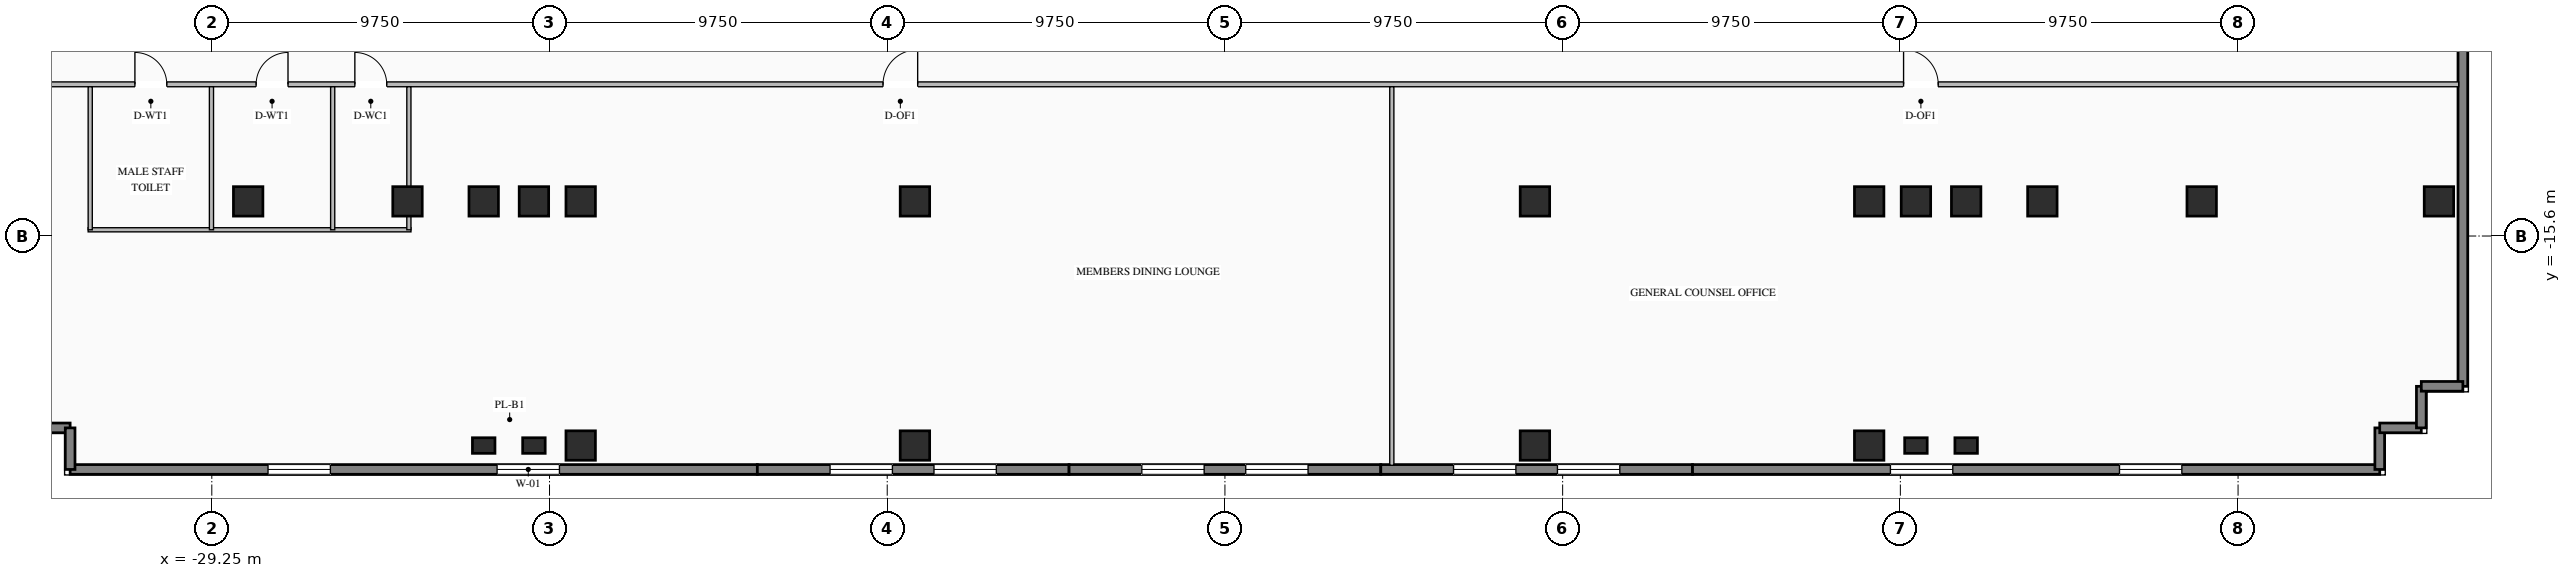
"""IFC4 building model, lengths in metres.
Left out: names, types, materials, properties, quantities, classifications, styles, units other than length and angle.
Written with IfcOpenShell. Run it as: python <this file> out.ifc"""

import sys

from ifc_helpers import new_model, si_unit, direction, frame, frame_2d, origin, origin_2d, place, context, subcontext, project, spatial, rectangle, i_section, extrude, element, fill, save


model = new_model("IFC4")
c1 = context("Model", 3, precision=1e-05, world=origin(), true_north=direction((0.0, 1.0)))
c2 = subcontext(c1, "Body", "Model", "MODEL_VIEW")
j1 = project(units=[si_unit("LENGTHUNIT", "METRE"), si_unit("PLANEANGLEUNIT", "RADIAN")], contexts=[c1])
p1 = place(None, origin())
s1 = spatial("IfcSite", under=j1, at=p1, CompositionType="ELEMENT")
p2 = place(p1, origin())
s2 = spatial("IfcBuilding", under=s1, at=p2, CompositionType="ELEMENT")
p3 = place(p2, frame((0.0, 0.0, 65.7)))
s3 = spatial("IfcBuildingStorey", under=s2, at=p3, CompositionType="ELEMENT", Elevation=65.7)
for number, where, z_axis, x_axis in (
    (1, (-21.4, -14.6, 0.0), (0.0, 0.0, 1.0), (1.0, 0.0, 0.0)),
    (2, (-19.95, -14.6, 0.0), (0.0, 0.0, 1.0), (1.0, 0.0, 0.0)),
    (3, (-18.6, -14.6, 0.0), (0.0, 0.0, 1.0), (1.0, 0.0, 0.0)),
    (4, (-8.95, -14.6, 0.0), (0.0, 0.0, 1.0), (1.0, 0.0, 0.0)),
    (5, (8.95, -14.6, 0.0), (0.0, 0.0, 1.0), (1.0, 0.0, 0.0)),
    (6, (18.6, -14.6, 0.0), (0.0, 0.0, 1.0), (1.0, 0.0, 0.0)),
    (7, (19.95, -14.6, 0.0), (0.0, 0.0, 1.0), (1.0, 0.0, 0.0)),
    (8, (21.4, -14.6, 0.0), (0.0, 0.0, 1.0), (1.0, 0.0, 0.0)),
    (9, (-23.6, -14.6, 0.0), (0.0, 0.0, 1.0), (1.0, 0.0, 0.0)),
    (10, (23.6, -14.6, 0.0), (0.0, 0.0, 1.0), (1.0, 0.0, 0.0)),
    (11, (-28.2, -14.6, 0.0), (0.0, 0.0, 1.0), (1.0, 0.0, 0.0)),
    (12, (28.2, -14.6, 0.0), (0.0, 0.0, 1.0), (1.0, 0.0, 0.0)),
    (13, (-18.6, -21.65, 0.0), (0.0, 0.0, 1.0), (1.0, 0.0, 0.0)),
    (14, (-8.95, -21.65, 0.0), (0.0, 0.0, 1.0), (1.0, 0.0, 0.0)),
    (15, (8.95, -21.65, 0.0), (0.0, 0.0, 1.0), (1.0, 0.0, 0.0)),
    (16, (18.6, -21.65, 0.0), (0.0, 0.0, 1.0), (1.0, 0.0, 0.0)),
    (17, (35.05, -14.6, 0.0), (0.0, 0.0, 1.0), (1.0, 0.0, 0.0)),
):
    element("IfcColumn", number, at=place(p3, frame(where, z_axis=z_axis, x_axis=x_axis)), inside=s3, PredefinedType="COLUMN", context=c2, shape_type="SweptSolid", body=[
        extrude(i_section(OverallWidth=0.85, OverallDepth=0.85, WebThickness=0.032, FlangeThickness=0.048, at=origin_2d()), origin(), (0.0, 0.0, 1.0), 4.3),
    ])
for number, where, z_axis, x_axis in (
    (18, (-21.4, -21.65, 0.0), (0.0, 0.0, 1.0), (1.0, 0.0, 0.0)),
    (19, (-19.95, -21.65, 0.0), (0.0, 0.0, 1.0), (1.0, 0.0, 0.0)),
    (20, (19.95, -21.65, 0.0), (0.0, 0.0, 1.0), (1.0, 0.0, 0.0)),
    (21, (21.4, -21.65, 0.0), (0.0, 0.0, 1.0), (1.0, 0.0, 0.0)),
):
    element("IfcColumn", number, at=place(p3, frame(where, z_axis=z_axis, x_axis=x_axis)), inside=s3, PredefinedType="PILASTER", context=c2, shape_type="SweptSolid", body=[
        extrude(rectangle(XDim=0.65, YDim=0.45, at=origin_2d()), origin(), (0.0, 0.0, 1.0), 4.3),
    ])
p4 = place(p3, frame((-13.5, -22.34, 0.0), z_axis=(0.0, 0.0, 1.0), x_axis=(-1.0, 0.0, 0.0)))
e22 = element("IfcWall", 22, at=p4, inside=s3, PredefinedType="STANDARD", context=c2, shape_type="SweptSolid", body=[
    extrude(rectangle(XDim=19.84, YDim=0.28, at=frame_2d((9.92, 0.0))), origin(), (0.0, 0.0, 1.0), 4.0),
])
p5 = place(p4, frame((5.713, 0.0, 0.76)))
e23 = element("IfcOpeningElement", 23, at=p5, cuts=e22, PredefinedType="OPENING", context=c2, shape_type="SweptSolid", body=[
    extrude(rectangle(XDim=1.8, YDim=1.95, at=frame_2d((0.9, 0.975))), frame((0.0, 0.15, 0.0), z_axis=(0.0, -1.0, 0.0), x_axis=(1.0, 0.0, 0.0)), (0.0, 0.0, 1.0), 0.3),
])
p6 = place(p4, frame((12.327, 0.0, 0.76)))
e24 = element("IfcOpeningElement", 24, at=p6, cuts=e22, PredefinedType="OPENING", context=c2, shape_type="SweptSolid", body=[
    extrude(rectangle(XDim=1.8, YDim=1.95, at=frame_2d((0.9, 0.975))), frame((0.0, 0.15, 0.0), z_axis=(0.0, -1.0, 0.0), x_axis=(1.0, 0.0, 0.0)), (0.0, 0.0, 1.0), 0.3),
])
p7 = place(p3, frame((-4.5, -22.34, 0.0), z_axis=(0.0, 0.0, 1.0), x_axis=(-1.0, 0.0, 0.0)))
e25 = element("IfcWall", 25, at=p7, inside=s3, PredefinedType="STANDARD", context=c2, shape_type="SweptSolid", body=[
    extrude(rectangle(XDim=9.0, YDim=0.28, at=frame_2d((4.5, 0.0))), origin(), (0.0, 0.0, 1.0), 4.0),
])
p8 = place(p7, frame((2.1, 0.0, 0.76)))
e26 = element("IfcOpeningElement", 26, at=p8, cuts=e25, PredefinedType="OPENING", context=c2, shape_type="SweptSolid", body=[
    extrude(rectangle(XDim=1.8, YDim=1.95, at=frame_2d((0.9, 0.975))), frame((0.0, 0.15, 0.0), z_axis=(0.0, -1.0, 0.0), x_axis=(1.0, 0.0, 0.0)), (0.0, 0.0, 1.0), 0.3),
])
p9 = place(p7, frame((5.1, 0.0, 0.76)))
e27 = element("IfcOpeningElement", 27, at=p9, cuts=e25, PredefinedType="OPENING", context=c2, shape_type="SweptSolid", body=[
    extrude(rectangle(XDim=1.8, YDim=1.95, at=frame_2d((0.9, 0.975))), frame((0.0, 0.15, 0.0), z_axis=(0.0, -1.0, 0.0), x_axis=(1.0, 0.0, 0.0)), (0.0, 0.0, 1.0), 0.3),
])
p10 = place(p3, frame((4.5, -22.34, 0.0), z_axis=(0.0, 0.0, 1.0), x_axis=(-1.0, 0.0, 0.0)))
e28 = element("IfcWall", 28, at=p10, inside=s3, PredefinedType="STANDARD", context=c2, shape_type="SweptSolid", body=[
    extrude(rectangle(XDim=9.0, YDim=0.28, at=frame_2d((4.5, 0.0))), origin(), (0.0, 0.0, 1.0), 4.0),
])
p11 = place(p10, frame((2.1, 0.0, 0.76)))
e29 = element("IfcOpeningElement", 29, at=p11, cuts=e28, PredefinedType="OPENING", context=c2, shape_type="SweptSolid", body=[
    extrude(rectangle(XDim=1.8, YDim=1.95, at=frame_2d((0.9, 0.975))), frame((0.0, 0.15, 0.0), z_axis=(0.0, -1.0, 0.0), x_axis=(1.0, 0.0, 0.0)), (0.0, 0.0, 1.0), 0.3),
])
p12 = place(p10, frame((5.1, 0.0, 0.76)))
e30 = element("IfcOpeningElement", 30, at=p12, cuts=e28, PredefinedType="OPENING", context=c2, shape_type="SweptSolid", body=[
    extrude(rectangle(XDim=1.8, YDim=1.95, at=frame_2d((0.9, 0.975))), frame((0.0, 0.15, 0.0), z_axis=(0.0, -1.0, 0.0), x_axis=(1.0, 0.0, 0.0)), (0.0, 0.0, 1.0), 0.3),
])
p13 = place(p3, frame((13.5, -22.34, 0.0), z_axis=(0.0, 0.0, 1.0), x_axis=(-1.0, 0.0, 0.0)))
e31 = element("IfcWall", 31, at=p13, inside=s3, PredefinedType="STANDARD", context=c2, shape_type="SweptSolid", body=[
    extrude(rectangle(XDim=9.0, YDim=0.28, at=frame_2d((4.5, 0.0))), origin(), (0.0, 0.0, 1.0), 4.0),
])
p14 = place(p13, frame((2.1, 0.0, 0.76)))
e32 = element("IfcOpeningElement", 32, at=p14, cuts=e31, PredefinedType="OPENING", context=c2, shape_type="SweptSolid", body=[
    extrude(rectangle(XDim=1.8, YDim=1.95, at=frame_2d((0.9, 0.975))), frame((0.0, 0.15, 0.0), z_axis=(0.0, -1.0, 0.0), x_axis=(1.0, 0.0, 0.0)), (0.0, 0.0, 1.0), 0.3),
])
p15 = place(p13, frame((5.1, 0.0, 0.76)))
e33 = element("IfcOpeningElement", 33, at=p15, cuts=e31, PredefinedType="OPENING", context=c2, shape_type="SweptSolid", body=[
    extrude(rectangle(XDim=1.8, YDim=1.95, at=frame_2d((0.9, 0.975))), frame((0.0, 0.15, 0.0), z_axis=(0.0, -1.0, 0.0), x_axis=(1.0, 0.0, 0.0)), (0.0, 0.0, 1.0), 0.3),
])
p16 = place(p3, frame((33.34, -22.34, 0.0), z_axis=(0.0, 0.0, 1.0), x_axis=(-1.0, 0.0, 0.0)))
e34 = element("IfcWall", 34, at=p16, inside=s3, PredefinedType="STANDARD", context=c2, shape_type="SweptSolid", body=[
    extrude(rectangle(XDim=19.84, YDim=0.28, at=frame_2d((9.92, 0.0))), origin(), (0.0, 0.0, 1.0), 4.0),
])
p17 = place(p16, frame((5.713, 0.0, 0.76)))
e35 = element("IfcOpeningElement", 35, at=p17, cuts=e34, PredefinedType="OPENING", context=c2, shape_type="SweptSolid", body=[
    extrude(rectangle(XDim=1.8, YDim=1.95, at=frame_2d((0.9, 0.975))), frame((0.0, 0.15, 0.0), z_axis=(0.0, -1.0, 0.0), x_axis=(1.0, 0.0, 0.0)), (0.0, 0.0, 1.0), 0.3),
])
p18 = place(p16, frame((12.327, 0.0, 0.76)))
e36 = element("IfcOpeningElement", 36, at=p18, cuts=e34, PredefinedType="OPENING", context=c2, shape_type="SweptSolid", body=[
    extrude(rectangle(XDim=1.8, YDim=1.95, at=frame_2d((0.9, 0.975))), frame((0.0, 0.15, 0.0), z_axis=(0.0, -1.0, 0.0), x_axis=(1.0, 0.0, 0.0)), (0.0, 0.0, 1.0), 0.3),
])
p19 = place(p3, frame((35.74, 0.0, 0.0), z_axis=(0.0, 0.0, 1.0), x_axis=(0.0, -1.0, 0.0)))
e37 = element("IfcWall", 37, at=p19, inside=s3, PredefinedType="STANDARD", context=c2, shape_type="SweptSolid", body=[
    extrude(rectangle(XDim=19.94, YDim=0.28, at=frame_2d((9.97, 0.0))), origin(), (0.0, 0.0, 1.0), 4.0),
])
p20 = place(p19, frame((5.847, 0.0, 0.76)))
e38 = element("IfcOpeningElement", 38, at=p20, cuts=e37, PredefinedType="OPENING", context=c2, shape_type="SweptSolid", body=[
    extrude(rectangle(XDim=1.6, YDim=1.95, at=frame_2d((0.8, 0.975))), frame((0.0, 0.15, 0.0), z_axis=(0.0, -1.0, 0.0), x_axis=(1.0, 0.0, 0.0)), (0.0, 0.0, 1.0), 0.3),
])
p21 = place(p3, frame((33.34, -22.34, 0.0), z_axis=(0.0, 0.0, 1.0), x_axis=(0.0, 1.0, 0.0)))
e39 = element("IfcWall", 39, at=p21, inside=s3, PredefinedType="STANDARD", context=c2, shape_type="SweptSolid", body=[
    extrude(rectangle(XDim=1.2, YDim=0.28, at=frame_2d((0.6, 0.0))), origin(), (0.0, 0.0, 1.0), 4.0),
])
for number, where, z_axis, x_axis in (
    (40, (33.34, -21.14, 0.0), (0.0, 0.0, 1.0), (1.0, 0.0, 0.0)),
    (41, (34.54, -21.14, 0.0), (0.0, 0.0, 1.0), (0.0, 1.0, 0.0)),
    (42, (34.54, -19.94, 0.0), (0.0, 0.0, 1.0), (1.0, 0.0, 0.0)),
    (43, (-34.54, -21.14, 0.0), (0.0, 0.0, 1.0), (1.0, 0.0, 0.0)),
):
    element("IfcWall", number, at=place(p3, frame(where, z_axis=z_axis, x_axis=x_axis)), inside=s3, PredefinedType="STANDARD", context=c2, shape_type="SweptSolid", body=[
        extrude(rectangle(XDim=1.2, YDim=0.28, at=frame_2d((0.6, 0.0))), origin(), (0.0, 0.0, 1.0), 4.0),
    ])
p22 = place(p3, frame((-33.34, -21.14, 0.0), z_axis=(0.0, 0.0, 1.0), x_axis=(0.0, -1.0, 0.0)))
e44 = element("IfcWall", 44, at=p22, inside=s3, PredefinedType="STANDARD", context=c2, shape_type="SweptSolid", body=[
    extrude(rectangle(XDim=1.2, YDim=0.28, at=frame_2d((0.6, 0.0))), origin(), (0.0, 0.0, 1.0), 4.0),
])
p23 = place(p3, frame((-35.62, -11.22, 0.0), z_axis=(0.0, 0.0, 1.0), x_axis=(1.0, 0.0, 0.0)))
e45 = element("IfcWall", 45, at=p23, inside=s3, PredefinedType="STANDARD", context=c2, shape_type="SweptSolid", body=[
    extrude(rectangle(XDim=71.24, YDim=0.14, at=frame_2d((35.62, 0.0))), origin(), (0.0, 0.0, 1.0), 3.495),
])
p24 = place(p23, frame((4.15, 0.0, 0.0)))
e46 = element("IfcOpeningElement", 46, at=p24, cuts=e45, PredefinedType="OPENING", context=c2, shape_type="SweptSolid", body=[
    extrude(rectangle(XDim=0.92, YDim=2.08, at=frame_2d((0.46, 1.04))), frame((0.0, 0.08, 0.0), z_axis=(0.0, -1.0, 0.0), x_axis=(1.0, 0.0, 0.0)), (0.0, 0.0, 1.0), 0.16),
])
p25 = place(p23, frame((7.65, 0.0, 0.0)))
e47 = element("IfcOpeningElement", 47, at=p25, cuts=e45, PredefinedType="OPENING", context=c2, shape_type="SweptSolid", body=[
    extrude(rectangle(XDim=0.92, YDim=2.08, at=frame_2d((0.46, 1.04))), frame((0.0, 0.08, 0.0), z_axis=(0.0, -1.0, 0.0), x_axis=(1.0, 0.0, 0.0)), (0.0, 0.0, 1.0), 0.16),
])
p26 = place(p23, frame((10.5, 0.0, 0.0)))
e48 = element("IfcOpeningElement", 48, at=p26, cuts=e45, PredefinedType="OPENING", context=c2, shape_type="SweptSolid", body=[
    extrude(rectangle(XDim=0.92, YDim=2.08, at=frame_2d((0.46, 1.04))), frame((0.0, 0.08, 0.0), z_axis=(0.0, -1.0, 0.0), x_axis=(1.0, 0.0, 0.0)), (0.0, 0.0, 1.0), 0.16),
])
p27 = place(p23, frame((25.749, 0.0, 0.0)))
e49 = element("IfcOpeningElement", 49, at=p27, cuts=e45, PredefinedType="OPENING", context=c2, shape_type="SweptSolid", body=[
    extrude(rectangle(XDim=1.0, YDim=2.08, at=frame_2d((0.5, 1.04))), frame((0.0, 0.08, 0.0), z_axis=(0.0, -1.0, 0.0), x_axis=(1.0, 0.0, 0.0)), (0.0, 0.0, 1.0), 0.16),
])
p28 = place(p23, frame((55.213, 0.0, 0.0)))
e50 = element("IfcOpeningElement", 50, at=p28, cuts=e45, PredefinedType="OPENING", context=c2, shape_type="SweptSolid", body=[
    extrude(rectangle(XDim=1.0, YDim=2.08, at=frame_2d((0.5, 1.04))), frame((0.0, 0.08, 0.0), z_axis=(0.0, -1.0, 0.0), x_axis=(1.0, 0.0, 0.0)), (0.0, 0.0, 1.0), 0.16),
])
p29 = place(p3, frame((-32.82, -15.42, 0.0), z_axis=(0.0, 0.0, 1.0), x_axis=(1.0, 0.0, 0.0)))
e51 = element("IfcWall", 51, at=p29, inside=s3, PredefinedType="STANDARD", context=c2, shape_type="SweptSolid", body=[
    extrude(rectangle(XDim=9.32, YDim=0.12, at=frame_2d((4.66, 0.0))), origin(), (0.0, 0.0, 1.0), 4.0),
])
for number, where, z_axis, x_axis in (
    (52, (-32.76, -15.42, 0.0), (0.0, 0.0, 1.0), (0.0, 1.0, 0.0)),
    (53, (-29.26, -15.42, 0.0), (0.0, 0.0, 1.0), (0.0, 1.0, 0.0)),
    (54, (-25.76, -15.42, 0.0), (0.0, 0.0, 1.0), (0.0, 1.0, 0.0)),
):
    element("IfcWall", number, at=place(p3, frame(where, z_axis=z_axis, x_axis=x_axis)), inside=s3, PredefinedType="STANDARD", context=c2, shape_type="SweptSolid", body=[
        extrude(rectangle(XDim=4.13, YDim=0.12, at=frame_2d((2.065, 0.0))), origin(), (0.0, 0.0, 1.0), 4.0),
    ])
p30 = place(p3, frame((-23.56, -15.42, 0.0), z_axis=(0.0, 0.0, 1.0), x_axis=(0.0, 1.0, 0.0)))
e55 = element("IfcWall", 55, at=p30, inside=s3, PredefinedType="STANDARD", context=c2, shape_type="SweptSolid", body=[
    extrude(rectangle(XDim=4.13, YDim=0.12, at=frame_2d((2.065, 0.0))), origin(), (0.0, 0.0, 1.0), 3.395),
])
p31 = place(p3, frame((4.818, -22.22, 0.0), z_axis=(0.0, 0.0, 1.0), x_axis=(0.0, 1.0, 0.0)))
e56 = element("IfcWall", 56, at=p31, inside=s3, PredefinedType="STANDARD", context=c2, shape_type="SweptSolid", body=[
    extrude(rectangle(XDim=10.93, YDim=0.12, at=frame_2d((5.465, 0.0))), origin(), (0.0, 0.0, 1.0), 4.0),
])
p32 = place(p5, origin())
e57 = element("IfcWindow", 57, at=p32, inside=s3, PartitioningType="SINGLE_PANEL", PredefinedType="WINDOW", context=c2, shape_type="SweptSolid", body=[
    extrude(rectangle(XDim=1.8, YDim=1.95, at=frame_2d((0.9, 0.975))), frame((0.0, 0.03, 0.0), z_axis=(0.0, -1.0, 0.0), x_axis=(1.0, 0.0, 0.0)), (0.0, 0.0, 1.0), 0.06),
])
fill(e23, e57)
p33 = place(p6, origin())
e58 = element("IfcWindow", 58, at=p33, inside=s3, PartitioningType="SINGLE_PANEL", PredefinedType="WINDOW", context=c2, shape_type="SweptSolid", body=[
    extrude(rectangle(XDim=1.8, YDim=1.95, at=frame_2d((0.9, 0.975))), frame((0.0, 0.03, 0.0), z_axis=(0.0, -1.0, 0.0), x_axis=(1.0, 0.0, 0.0)), (0.0, 0.0, 1.0), 0.06),
])
fill(e24, e58)
p34 = place(p8, origin())
e59 = element("IfcWindow", 59, at=p34, inside=s3, PartitioningType="SINGLE_PANEL", PredefinedType="WINDOW", context=c2, shape_type="SweptSolid", body=[
    extrude(rectangle(XDim=1.8, YDim=1.95, at=frame_2d((0.9, 0.975))), frame((0.0, 0.03, 0.0), z_axis=(0.0, -1.0, 0.0), x_axis=(1.0, 0.0, 0.0)), (0.0, 0.0, 1.0), 0.06),
])
fill(e26, e59)
p35 = place(p9, origin())
e60 = element("IfcWindow", 60, at=p35, inside=s3, PartitioningType="SINGLE_PANEL", PredefinedType="WINDOW", context=c2, shape_type="SweptSolid", body=[
    extrude(rectangle(XDim=1.8, YDim=1.95, at=frame_2d((0.9, 0.975))), frame((0.0, 0.03, 0.0), z_axis=(0.0, -1.0, 0.0), x_axis=(1.0, 0.0, 0.0)), (0.0, 0.0, 1.0), 0.06),
])
fill(e27, e60)
p36 = place(p11, origin())
e61 = element("IfcWindow", 61, at=p36, inside=s3, PartitioningType="SINGLE_PANEL", PredefinedType="WINDOW", context=c2, shape_type="SweptSolid", body=[
    extrude(rectangle(XDim=1.8, YDim=1.95, at=frame_2d((0.9, 0.975))), frame((0.0, 0.03, 0.0), z_axis=(0.0, -1.0, 0.0), x_axis=(1.0, 0.0, 0.0)), (0.0, 0.0, 1.0), 0.06),
])
fill(e29, e61)
p37 = place(p12, origin())
e62 = element("IfcWindow", 62, at=p37, inside=s3, PartitioningType="SINGLE_PANEL", PredefinedType="WINDOW", context=c2, shape_type="SweptSolid", body=[
    extrude(rectangle(XDim=1.8, YDim=1.95, at=frame_2d((0.9, 0.975))), frame((0.0, 0.03, 0.0), z_axis=(0.0, -1.0, 0.0), x_axis=(1.0, 0.0, 0.0)), (0.0, 0.0, 1.0), 0.06),
])
fill(e30, e62)
p38 = place(p14, origin())
e63 = element("IfcWindow", 63, at=p38, inside=s3, PartitioningType="SINGLE_PANEL", PredefinedType="WINDOW", context=c2, shape_type="SweptSolid", body=[
    extrude(rectangle(XDim=1.8, YDim=1.95, at=frame_2d((0.9, 0.975))), frame((0.0, 0.03, 0.0), z_axis=(0.0, -1.0, 0.0), x_axis=(1.0, 0.0, 0.0)), (0.0, 0.0, 1.0), 0.06),
])
fill(e32, e63)
p39 = place(p15, origin())
e64 = element("IfcWindow", 64, at=p39, inside=s3, PartitioningType="SINGLE_PANEL", PredefinedType="WINDOW", context=c2, shape_type="SweptSolid", body=[
    extrude(rectangle(XDim=1.8, YDim=1.95, at=frame_2d((0.9, 0.975))), frame((0.0, 0.03, 0.0), z_axis=(0.0, -1.0, 0.0), x_axis=(1.0, 0.0, 0.0)), (0.0, 0.0, 1.0), 0.06),
])
fill(e33, e64)
p40 = place(p17, origin())
e65 = element("IfcWindow", 65, at=p40, inside=s3, PartitioningType="SINGLE_PANEL", PredefinedType="WINDOW", context=c2, shape_type="SweptSolid", body=[
    extrude(rectangle(XDim=1.8, YDim=1.95, at=frame_2d((0.9, 0.975))), frame((0.0, 0.03, 0.0), z_axis=(0.0, -1.0, 0.0), x_axis=(1.0, 0.0, 0.0)), (0.0, 0.0, 1.0), 0.06),
])
fill(e35, e65)
p41 = place(p18, origin())
e66 = element("IfcWindow", 66, at=p41, inside=s3, PartitioningType="SINGLE_PANEL", PredefinedType="WINDOW", context=c2, shape_type="SweptSolid", body=[
    extrude(rectangle(XDim=1.8, YDim=1.95, at=frame_2d((0.9, 0.975))), frame((0.0, 0.03, 0.0), z_axis=(0.0, -1.0, 0.0), x_axis=(1.0, 0.0, 0.0)), (0.0, 0.0, 1.0), 0.06),
])
fill(e36, e66)
p42 = place(p24, origin())
e67 = element("IfcDoor", 67, at=p42, inside=s3, OperationType="SINGLE_SWING_LEFT", PredefinedType="DOOR", context=c2, shape_type="SweptSolid", body=[
    extrude(rectangle(XDim=0.92, YDim=2.08, at=frame_2d((0.46, 1.04))), frame((0.0, 0.025, 0.0), z_axis=(0.0, -1.0, 0.0), x_axis=(1.0, 0.0, 0.0)), (0.0, 0.0, 1.0), 0.05),
])
fill(e46, e67)
p43 = place(p25, origin())
e68 = element("IfcDoor", 68, at=p43, inside=s3, OperationType="SINGLE_SWING_RIGHT", PredefinedType="DOOR", context=c2, shape_type="SweptSolid", body=[
    extrude(rectangle(XDim=0.92, YDim=2.08, at=frame_2d((0.46, 1.04))), frame((0.0, 0.025, 0.0), z_axis=(0.0, -1.0, 0.0), x_axis=(1.0, 0.0, 0.0)), (0.0, 0.0, 1.0), 0.05),
])
fill(e47, e68)
p44 = place(p26, origin())
e69 = element("IfcDoor", 69, at=p44, inside=s3, OperationType="SINGLE_SWING_LEFT", PredefinedType="DOOR", context=c2, shape_type="SweptSolid", body=[
    extrude(rectangle(XDim=0.92, YDim=2.08, at=frame_2d((0.46, 1.04))), frame((0.0, 0.025, 0.0), z_axis=(0.0, -1.0, 0.0), x_axis=(1.0, 0.0, 0.0)), (0.0, 0.0, 1.0), 0.05),
])
fill(e48, e69)
p45 = place(p27, origin())
e70 = element("IfcDoor", 70, at=p45, inside=s3, OperationType="SINGLE_SWING_RIGHT", PredefinedType="DOOR", context=c2, shape_type="SweptSolid", body=[
    extrude(rectangle(XDim=1.0, YDim=2.08, at=frame_2d((0.5, 1.04))), frame((0.0, 0.025, 0.0), z_axis=(0.0, -1.0, 0.0), x_axis=(1.0, 0.0, 0.0)), (0.0, 0.0, 1.0), 0.05),
])
fill(e49, e70)
p46 = place(p28, origin())
e71 = element("IfcDoor", 71, at=p46, inside=s3, OperationType="SINGLE_SWING_LEFT", PredefinedType="DOOR", context=c2, shape_type="SweptSolid", body=[
    extrude(rectangle(XDim=1.0, YDim=2.08, at=frame_2d((0.5, 1.04))), frame((0.0, 0.025, 0.0), z_axis=(0.0, -1.0, 0.0), x_axis=(1.0, 0.0, 0.0)), (0.0, 0.0, 1.0), 0.05),
])
fill(e50, e71)
save(model, sys.argv[1])
